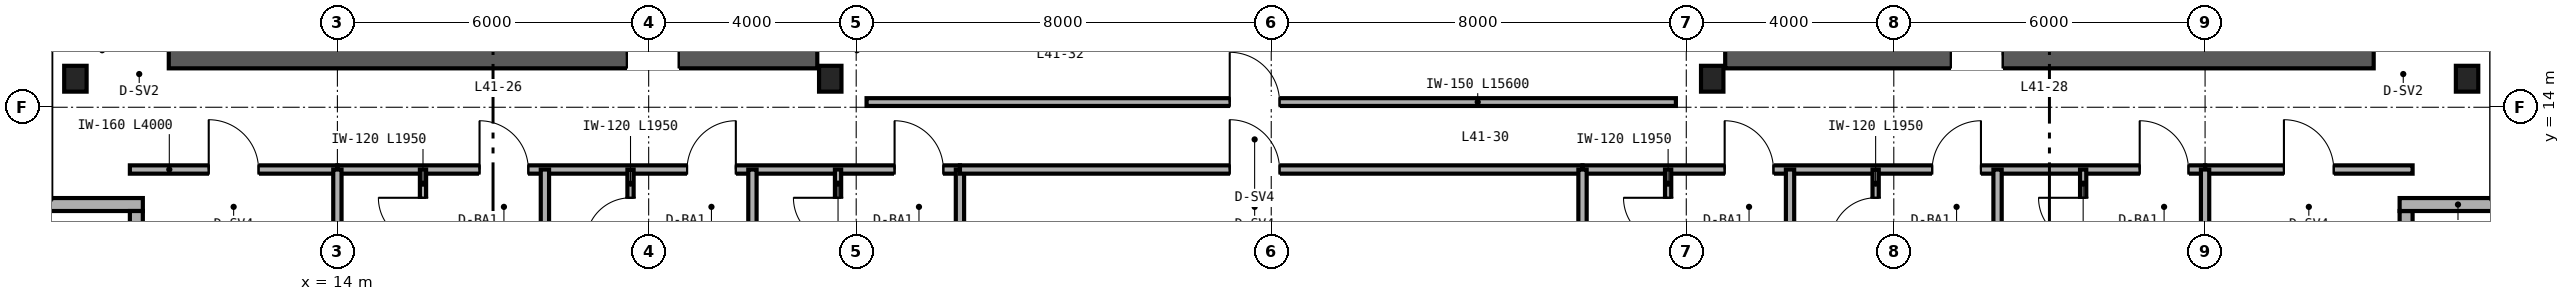
"""IFC4 building model, lengths in metres.
Left out: names, types, materials, properties, quantities, classifications, styles, units other than length and angle.
Written with IfcOpenShell. Run it as: python <this file> out.ifc"""

import sys

from ifc_helpers import new_model, si_unit, direction, frame, frame_2d, origin, origin_2d, place, context, subcontext, project, spatial, rectangle, i_section, extrude, source, transform, mapped, element, fill, save


model = new_model("IFC4")
c1 = context("Model", 3, precision=1e-05, world=origin(), true_north=direction((0.0, 1.0)))
c2 = subcontext(c1, "Body", "Model", "MODEL_VIEW")
j1 = project(units=[si_unit("LENGTHUNIT", "METRE"), si_unit("PLANEANGLEUNIT", "RADIAN")], contexts=[c1])
p1 = place(None, origin())
s1 = spatial("IfcSite", under=j1, at=p1, CompositionType="ELEMENT")
p2 = place(p1, origin())
s2 = spatial("IfcBuilding", under=s1, at=p2, CompositionType="ELEMENT")
p3 = place(p2, frame((0.0, 0.0, 166.8)))
s3 = spatial("IfcBuildingStorey", under=s2, at=p3, CompositionType="ELEMENT", Elevation=166.8)
p4 = place(p3, frame((10.75, 15.0, 0.0), z_axis=(0.0, 0.0, 1.0), x_axis=(1.0, 0.0, 0.0)))
e1 = element("IfcWall", 1, at=p4, inside=s3, PredefinedType="SHEAR", context=c2, shape_type="SweptSolid", body=[
    extrude(rectangle(XDim=12.5, YDim=0.5, at=frame_2d((6.25, 0.0))), origin(), (0.0, 0.0, 1.0), 3.37),
])
p5 = place(p4, frame((8.83, 0.0, 0.0)))
e2 = element("IfcOpeningElement", 2, at=p5, cuts=e1, PredefinedType="OPENING", context=c2, shape_type="SweptSolid", body=[
    extrude(rectangle(XDim=1.0, YDim=2.15, at=frame_2d((0.5, 1.075))), frame((0.0, 0.26, 0.0), z_axis=(0.0, -1.0, 0.0), x_axis=(1.0, 0.0, 0.0)), (0.0, 0.0, 1.0), 0.52),
])
p6 = place(p3, frame((40.75, 15.0, 0.0), z_axis=(0.0, 0.0, 1.0), x_axis=(1.0, 0.0, 0.0)))
e3 = element("IfcWall", 3, at=p6, inside=s3, PredefinedType="SHEAR", context=c2, shape_type="SweptSolid", body=[
    extrude(rectangle(XDim=12.5, YDim=0.5, at=frame_2d((6.25, 0.0))), origin(), (0.0, 0.0, 1.0), 3.37),
])
p7 = place(p6, frame((4.35, 0.0, 0.0)))
e4 = element("IfcOpeningElement", 4, at=p7, cuts=e3, PredefinedType="OPENING", context=c2, shape_type="SweptSolid", body=[
    extrude(rectangle(XDim=1.0, YDim=2.15, at=frame_2d((0.5, 1.075))), frame((0.0, 0.26, 0.0), z_axis=(0.0, -1.0, 0.0), x_axis=(1.0, 0.0, 0.0)), (0.0, 0.0, 1.0), 0.52),
])
m1 = source(origin(), c2, "Body", "SweptSolid", [
    extrude(i_section(OverallWidth=0.432, OverallDepth=0.498, WebThickness=0.056, FlangeThickness=0.089, FilletRadius=0.025, at=origin_2d()), origin(), (0.0, 0.0, 1.0), 3.37),
])
for number, where, z_axis, x_axis in (
    (5, (8.95, 14.55, 0.0), (0.0, 0.0, 1.0), (1.0, 0.0, 0.0)),
    (6, (23.5, 14.55, 0.0), (0.0, 0.0, 1.0), (1.0, 0.0, 0.0)),
    (7, (40.5, 14.55, 0.0), (0.0, 0.0, 1.0), (1.0, 0.0, 0.0)),
    (8, (55.05, 14.55, 0.0), (0.0, 0.0, 1.0), (1.0, 0.0, 0.0)),
):
    element("IfcColumn", number, at=place(p3, frame(where, z_axis=z_axis, x_axis=x_axis)), inside=s3, PredefinedType="COLUMN", context=c2, shape_type="MappedRepresentation", body=[
        mapped(m1, transform((0.0, 0.0, 0.0), scale=1.0)),
    ])
p8 = place(p3, frame((53.875, 10.0, 0.0), z_axis=(0.0, 0.0, 1.0), x_axis=(0.0, 1.0, 0.0)))
e9 = element("IfcWall", 9, at=p8, inside=s3, PredefinedType="SOLIDWALL", context=c2, shape_type="SweptSolid", body=[
    extrude(rectangle(XDim=2.0, YDim=0.25, at=frame_2d((1.0, 0.0))), origin(), (0.0, 0.0, 1.0), 3.37),
])
for number, where, z_axis, x_axis in (
    (10, (53.75, 12.125, 0.0), (0.0, 0.0, 1.0), (1.0, 0.0, 0.0)),
    (11, (8.0, 12.125, 0.0), (0.0, 0.0, 1.0), (1.0, 0.0, 0.0)),
):
    element("IfcWall", number, at=place(p3, frame(where, z_axis=z_axis, x_axis=x_axis)), inside=s3, PredefinedType="SOLIDWALL", context=c2, shape_type="SweptSolid", body=[
        extrude(rectangle(XDim=2.25, YDim=0.25, at=frame_2d((1.125, 0.0))), origin(), (0.0, 0.0, 1.0), 3.37),
    ])
p9 = place(p3, frame((10.125, 12.0, 0.0), z_axis=(0.0, 0.0, 1.0), x_axis=(0.0, -1.0, 0.0)))
e12 = element("IfcWall", 12, at=p9, inside=s3, PredefinedType="SOLIDWALL", context=c2, shape_type="SweptSolid", body=[
    extrude(rectangle(XDim=2.0, YDim=0.25, at=frame_2d((1.0, 0.0))), origin(), (0.0, 0.0, 1.0), 3.37),
])
p10 = place(p3, frame((24.2, 14.1, 0.0), z_axis=(0.0, 0.0, 1.0), x_axis=(1.0, 0.0, 0.0)))
e13 = element("IfcWall", 13, at=p10, inside=s3, PredefinedType="PARTITIONING", context=c2, shape_type="SweptSolid", body=[
    extrude(rectangle(XDim=15.6, YDim=0.15, at=frame_2d((7.8, 0.0))), origin(), (0.0, 0.0, 1.0), 3.37),
])
p11 = place(p10, frame((7.0, 0.0, 0.0)))
e14 = element("IfcOpeningElement", 14, at=p11, cuts=e13, PredefinedType="OPENING", context=c2, shape_type="SweptSolid", body=[
    extrude(rectangle(XDim=0.96, YDim=2.15, at=frame_2d((0.48, 1.075))), frame((0.0, 0.085, 0.0), z_axis=(0.0, -1.0, 0.0), x_axis=(1.0, 0.0, 0.0)), (0.0, 0.0, 1.0), 0.17),
])
p12 = place(p3, frame((10.0, 12.8, 0.0), z_axis=(0.0, 0.0, 1.0), x_axis=(1.0, 0.0, 0.0)))
e15 = element("IfcWall", 15, at=p12, inside=s3, PredefinedType="PARTITIONING", context=c2, shape_type="SweptSolid", body=[
    extrude(rectangle(XDim=4.0, YDim=0.16, at=frame_2d((2.0, 0.0))), origin(), (0.0, 0.0, 1.0), 3.37),
])
p13 = place(p12, frame((1.52, 0.0, 0.0)))
e16 = element("IfcOpeningElement", 16, at=p13, cuts=e15, PredefinedType="OPENING", context=c2, shape_type="SweptSolid", body=[
    extrude(rectangle(XDim=0.96, YDim=2.15, at=frame_2d((0.48, 1.075))), frame((0.0, 0.09, 0.0), z_axis=(0.0, -1.0, 0.0), x_axis=(1.0, 0.0, 0.0)), (0.0, 0.0, 1.0), 0.18),
])
p14 = place(p3, frame((50.0, 12.8, 0.0), z_axis=(0.0, 0.0, 1.0), x_axis=(1.0, 0.0, 0.0)))
e17 = element("IfcWall", 17, at=p14, inside=s3, PredefinedType="PARTITIONING", context=c2, shape_type="SweptSolid", body=[
    extrude(rectangle(XDim=4.0, YDim=0.16, at=frame_2d((2.0, 0.0))), origin(), (0.0, 0.0, 1.0), 3.37),
])
p15 = place(p14, frame((1.52, 0.0, 0.0)))
e18 = element("IfcOpeningElement", 18, at=p15, cuts=e17, PredefinedType="OPENING", context=c2, shape_type="SweptSolid", body=[
    extrude(rectangle(XDim=0.96, YDim=2.15, at=frame_2d((0.48, 1.075))), frame((0.0, 0.09, 0.0), z_axis=(0.0, -1.0, 0.0), x_axis=(1.0, 0.0, 0.0)), (0.0, 0.0, 1.0), 0.18),
])
p16 = place(p3, frame((14.0, 12.8, 0.0), z_axis=(0.0, 0.0, 1.0), x_axis=(1.0, 0.0, 0.0)))
e19 = element("IfcWall", 19, at=p16, inside=s3, PredefinedType="PARTITIONING", context=c2, shape_type="SweptSolid", body=[
    extrude(rectangle(XDim=12.0, YDim=0.16, at=frame_2d((6.0, 0.0))), origin(), (0.0, 0.0, 1.0), 2.913),
])
p17 = place(p16, frame((2.74, 0.0, 0.0)))
e20 = element("IfcOpeningElement", 20, at=p17, cuts=e19, PredefinedType="OPENING", context=c2, shape_type="SweptSolid", body=[
    extrude(rectangle(XDim=0.94, YDim=2.15, at=frame_2d((0.47, 1.075))), frame((0.0, 0.09, 0.0), z_axis=(0.0, -1.0, 0.0), x_axis=(1.0, 0.0, 0.0)), (0.0, 0.0, 1.0), 0.18),
])
p18 = place(p16, frame((6.74, 0.0, 0.0)))
e21 = element("IfcOpeningElement", 21, at=p18, cuts=e19, PredefinedType="OPENING", context=c2, shape_type="SweptSolid", body=[
    extrude(rectangle(XDim=0.94, YDim=2.15, at=frame_2d((0.47, 1.075))), frame((0.0, 0.09, 0.0), z_axis=(0.0, -1.0, 0.0), x_axis=(1.0, 0.0, 0.0)), (0.0, 0.0, 1.0), 0.18),
])
p19 = place(p16, frame((10.74, 0.0, 0.0)))
e22 = element("IfcOpeningElement", 22, at=p19, cuts=e19, PredefinedType="OPENING", context=c2, shape_type="SweptSolid", body=[
    extrude(rectangle(XDim=0.94, YDim=2.15, at=frame_2d((0.47, 1.075))), frame((0.0, 0.09, 0.0), z_axis=(0.0, -1.0, 0.0), x_axis=(1.0, 0.0, 0.0)), (0.0, 0.0, 1.0), 0.18),
])
p20 = place(p3, frame((14.0, 6.36, 0.0), z_axis=(0.0, 0.0, 1.0), x_axis=(0.0, 1.0, 0.0)))
e23 = element("IfcWall", 23, at=p20, inside=s3, PredefinedType="PARTITIONING", context=c2, shape_type="SweptSolid", body=[
    extrude(rectangle(XDim=6.44, YDim=0.16, at=frame_2d((3.22, 0.0))), origin(), (0.0, 0.0, 1.0), 2.677),
])
p21 = place(p3, frame((26.0, 6.36, 0.0), z_axis=(0.0, 0.0, 1.0), x_axis=(0.0, 1.0, 0.0)))
e24 = element("IfcWall", 24, at=p21, inside=s3, PredefinedType="PARTITIONING", context=c2, shape_type="SweptSolid", body=[
    extrude(rectangle(XDim=6.44, YDim=0.16, at=frame_2d((3.22, 0.0))), origin(), (0.0, 0.0, 1.0), 2.443),
])
p22 = place(p3, frame((18.0, 6.36, 0.0), z_axis=(0.0, 0.0, 1.0), x_axis=(0.0, 1.0, 0.0)))
e25 = element("IfcWall", 25, at=p22, inside=s3, PredefinedType="PARTITIONING", context=c2, shape_type="SweptSolid", body=[
    extrude(rectangle(XDim=6.44, YDim=0.16, at=frame_2d((3.22, 0.0))), origin(), (0.0, 0.0, 1.0), 2.677),
])
p23 = place(p3, frame((15.65, 10.85, 0.0), z_axis=(0.0, 0.0, 1.0), x_axis=(0.0, 1.0, 0.0)))
e26 = element("IfcWall", 26, at=p23, inside=s3, PredefinedType="PARTITIONING", context=c2, shape_type="SweptSolid", body=[
    extrude(rectangle(XDim=1.95, YDim=0.12, at=frame_2d((0.975, 0.0))), origin(), (0.0, 0.0, 1.0), 3.37),
])
p24 = place(p23, frame((0.545, 0.0, 0.0)))
e27 = element("IfcOpeningElement", 27, at=p24, cuts=e26, PredefinedType="OPENING", context=c2, shape_type="SweptSolid", body=[
    extrude(rectangle(XDim=0.86, YDim=2.1, at=frame_2d((0.43, 1.05))), frame((0.0, 0.07, 0.0), z_axis=(0.0, -1.0, 0.0), x_axis=(1.0, 0.0, 0.0)), (0.0, 0.0, 1.0), 0.14),
])
p25 = place(p3, frame((22.0, 6.36, 0.0), z_axis=(0.0, 0.0, 1.0), x_axis=(0.0, 1.0, 0.0)))
e28 = element("IfcWall", 28, at=p25, inside=s3, PredefinedType="PARTITIONING", context=c2, shape_type="SweptSolid", body=[
    extrude(rectangle(XDim=6.44, YDim=0.16, at=frame_2d((3.22, 0.0))), origin(), (0.0, 0.0, 1.0), 2.833),
])
p26 = place(p3, frame((19.65, 10.85, 0.0), z_axis=(0.0, 0.0, 1.0), x_axis=(0.0, 1.0, 0.0)))
e29 = element("IfcWall", 29, at=p26, inside=s3, PredefinedType="PARTITIONING", context=c2, shape_type="SweptSolid", body=[
    extrude(rectangle(XDim=1.95, YDim=0.12, at=frame_2d((0.975, 0.0))), origin(), (0.0, 0.0, 1.0), 3.37),
])
p27 = place(p26, frame((0.545, 0.0, 0.0)))
e30 = element("IfcOpeningElement", 30, at=p27, cuts=e29, PredefinedType="OPENING", context=c2, shape_type="SweptSolid", body=[
    extrude(rectangle(XDim=0.86, YDim=2.1, at=frame_2d((0.43, 1.05))), frame((0.0, 0.07, 0.0), z_axis=(0.0, -1.0, 0.0), x_axis=(1.0, 0.0, 0.0)), (0.0, 0.0, 1.0), 0.14),
])
p28 = place(p3, frame((23.65, 10.85, 0.0), z_axis=(0.0, 0.0, 1.0), x_axis=(0.0, 1.0, 0.0)))
e31 = element("IfcWall", 31, at=p28, inside=s3, PredefinedType="PARTITIONING", context=c2, shape_type="SweptSolid", body=[
    extrude(rectangle(XDim=1.95, YDim=0.12, at=frame_2d((0.975, 0.0))), origin(), (0.0, 0.0, 1.0), 2.913),
])
p29 = place(p28, frame((0.545, 0.0, 0.0)))
e32 = element("IfcOpeningElement", 32, at=p29, cuts=e31, PredefinedType="OPENING", context=c2, shape_type="SweptSolid", body=[
    extrude(rectangle(XDim=0.86, YDim=2.1, at=frame_2d((0.43, 1.05))), frame((0.0, 0.07, 0.0), z_axis=(0.0, -1.0, 0.0), x_axis=(1.0, 0.0, 0.0)), (0.0, 0.0, 1.0), 0.14),
])
p30 = place(p3, frame((26.0, 12.8, 0.0), z_axis=(0.0, 0.0, 1.0), x_axis=(1.0, 0.0, 0.0)))
e33 = element("IfcWall", 33, at=p30, inside=s3, PredefinedType="PARTITIONING", context=c2, shape_type="SweptSolid", body=[
    extrude(rectangle(XDim=12.0, YDim=0.16, at=frame_2d((6.0, 0.0))), origin(), (0.0, 0.0, 1.0), 3.37),
])
p31 = place(p30, frame((5.2, 0.0, 0.0)))
e34 = element("IfcOpeningElement", 34, at=p31, cuts=e33, PredefinedType="OPENING", context=c2, shape_type="SweptSolid", body=[
    extrude(rectangle(XDim=0.96, YDim=2.15, at=frame_2d((0.48, 1.075))), frame((0.0, 0.09, 0.0), z_axis=(0.0, -1.0, 0.0), x_axis=(1.0, 0.0, 0.0)), (0.0, 0.0, 1.0), 0.18),
])
p32 = place(p3, frame((38.0, 12.8, 0.0), z_axis=(0.0, 0.0, 1.0), x_axis=(1.0, 0.0, 0.0)))
e35 = element("IfcWall", 35, at=p32, inside=s3, PredefinedType="PARTITIONING", context=c2, shape_type="SweptSolid", body=[
    extrude(rectangle(XDim=12.0, YDim=0.16, at=frame_2d((6.0, 0.0))), origin(), (0.0, 0.0, 1.0), 2.913),
])
p33 = place(p32, frame((2.74, 0.0, 0.0)))
e36 = element("IfcOpeningElement", 36, at=p33, cuts=e35, PredefinedType="OPENING", context=c2, shape_type="SweptSolid", body=[
    extrude(rectangle(XDim=0.94, YDim=2.15, at=frame_2d((0.47, 1.075))), frame((0.0, 0.09, 0.0), z_axis=(0.0, -1.0, 0.0), x_axis=(1.0, 0.0, 0.0)), (0.0, 0.0, 1.0), 0.18),
])
p34 = place(p32, frame((6.74, 0.0, 0.0)))
e37 = element("IfcOpeningElement", 37, at=p34, cuts=e35, PredefinedType="OPENING", context=c2, shape_type="SweptSolid", body=[
    extrude(rectangle(XDim=0.94, YDim=2.15, at=frame_2d((0.47, 1.075))), frame((0.0, 0.09, 0.0), z_axis=(0.0, -1.0, 0.0), x_axis=(1.0, 0.0, 0.0)), (0.0, 0.0, 1.0), 0.18),
])
p35 = place(p32, frame((10.74, 0.0, 0.0)))
e38 = element("IfcOpeningElement", 38, at=p35, cuts=e35, PredefinedType="OPENING", context=c2, shape_type="SweptSolid", body=[
    extrude(rectangle(XDim=0.94, YDim=2.15, at=frame_2d((0.47, 1.075))), frame((0.0, 0.09, 0.0), z_axis=(0.0, -1.0, 0.0), x_axis=(1.0, 0.0, 0.0)), (0.0, 0.0, 1.0), 0.18),
])
p36 = place(p3, frame((38.0, 6.36, 0.0), z_axis=(0.0, 0.0, 1.0), x_axis=(0.0, 1.0, 0.0)))
e39 = element("IfcWall", 39, at=p36, inside=s3, PredefinedType="PARTITIONING", context=c2, shape_type="SweptSolid", body=[
    extrude(rectangle(XDim=6.44, YDim=0.16, at=frame_2d((3.22, 0.0))), origin(), (0.0, 0.0, 1.0), 2.443),
])
p37 = place(p3, frame((50.0, 6.36, 0.0), z_axis=(0.0, 0.0, 1.0), x_axis=(0.0, 1.0, 0.0)))
e40 = element("IfcWall", 40, at=p37, inside=s3, PredefinedType="PARTITIONING", context=c2, shape_type="SweptSolid", body=[
    extrude(rectangle(XDim=6.44, YDim=0.16, at=frame_2d((3.22, 0.0))), origin(), (0.0, 0.0, 1.0), 2.677),
])
p38 = place(p3, frame((42.0, 6.36, 0.0), z_axis=(0.0, 0.0, 1.0), x_axis=(0.0, 1.0, 0.0)))
e41 = element("IfcWall", 41, at=p38, inside=s3, PredefinedType="PARTITIONING", context=c2, shape_type="SweptSolid", body=[
    extrude(rectangle(XDim=6.44, YDim=0.16, at=frame_2d((3.22, 0.0))), origin(), (0.0, 0.0, 1.0), 2.833),
])
p39 = place(p3, frame((39.65, 10.85, 0.0), z_axis=(0.0, 0.0, 1.0), x_axis=(0.0, 1.0, 0.0)))
e42 = element("IfcWall", 42, at=p39, inside=s3, PredefinedType="PARTITIONING", context=c2, shape_type="SweptSolid", body=[
    extrude(rectangle(XDim=1.95, YDim=0.12, at=frame_2d((0.975, 0.0))), origin(), (0.0, 0.0, 1.0), 3.37),
])
p40 = place(p39, frame((0.545, 0.0, 0.0)))
e43 = element("IfcOpeningElement", 43, at=p40, cuts=e42, PredefinedType="OPENING", context=c2, shape_type="SweptSolid", body=[
    extrude(rectangle(XDim=0.86, YDim=2.1, at=frame_2d((0.43, 1.05))), frame((0.0, 0.07, 0.0), z_axis=(0.0, -1.0, 0.0), x_axis=(1.0, 0.0, 0.0)), (0.0, 0.0, 1.0), 0.14),
])
p41 = place(p3, frame((46.0, 6.36, 0.0), z_axis=(0.0, 0.0, 1.0), x_axis=(0.0, 1.0, 0.0)))
e44 = element("IfcWall", 44, at=p41, inside=s3, PredefinedType="PARTITIONING", context=c2, shape_type="SweptSolid", body=[
    extrude(rectangle(XDim=6.44, YDim=0.16, at=frame_2d((3.22, 0.0))), origin(), (0.0, 0.0, 1.0), 2.677),
])
p42 = place(p3, frame((43.65, 10.85, 0.0), z_axis=(0.0, 0.0, 1.0), x_axis=(0.0, 1.0, 0.0)))
e45 = element("IfcWall", 45, at=p42, inside=s3, PredefinedType="PARTITIONING", context=c2, shape_type="SweptSolid", body=[
    extrude(rectangle(XDim=1.95, YDim=0.12, at=frame_2d((0.975, 0.0))), origin(), (0.0, 0.0, 1.0), 3.37),
])
p43 = place(p42, frame((0.545, 0.0, 0.0)))
e46 = element("IfcOpeningElement", 46, at=p43, cuts=e45, PredefinedType="OPENING", context=c2, shape_type="SweptSolid", body=[
    extrude(rectangle(XDim=0.86, YDim=2.1, at=frame_2d((0.43, 1.05))), frame((0.0, 0.07, 0.0), z_axis=(0.0, -1.0, 0.0), x_axis=(1.0, 0.0, 0.0)), (0.0, 0.0, 1.0), 0.14),
])
p44 = place(p3, frame((47.65, 10.85, 0.0), z_axis=(0.0, 0.0, 1.0), x_axis=(0.0, 1.0, 0.0)))
e47 = element("IfcWall", 47, at=p44, inside=s3, PredefinedType="PARTITIONING", context=c2, shape_type="SweptSolid", body=[
    extrude(rectangle(XDim=1.95, YDim=0.12, at=frame_2d((0.975, 0.0))), origin(), (0.0, 0.0, 1.0), 3.37),
])
p45 = place(p44, frame((0.545, 0.0, 0.0)))
e48 = element("IfcOpeningElement", 48, at=p45, cuts=e47, PredefinedType="OPENING", context=c2, shape_type="SweptSolid", body=[
    extrude(rectangle(XDim=0.86, YDim=2.1, at=frame_2d((0.43, 1.05))), frame((0.0, 0.07, 0.0), z_axis=(0.0, -1.0, 0.0), x_axis=(1.0, 0.0, 0.0)), (0.0, 0.0, 1.0), 0.14),
])
m2 = source(origin(), c2, "Body", "SweptSolid", [
    extrude(rectangle(XDim=1.0, YDim=2.15, at=frame_2d((0.5, 1.075))), frame((0.0, 0.025, 0.0), z_axis=(0.0, -1.0, 0.0), x_axis=(1.0, 0.0, 0.0)), (0.0, 0.0, 1.0), 0.05),
])
p46 = place(p5, origin())
e49 = element("IfcDoor", 49, at=p46, inside=s3, OperationType="SINGLE_SWING_LEFT", PredefinedType="DOOR", context=c2, shape_type="MappedRepresentation", body=[
    mapped(m2, transform((0.0, 0.0, 0.0), scale=1.0)),
])
fill(e2, e49)
p47 = place(p7, origin())
e50 = element("IfcDoor", 50, at=p47, inside=s3, OperationType="SINGLE_SWING_RIGHT", PredefinedType="DOOR", context=c2, shape_type="MappedRepresentation", body=[
    mapped(m2, transform((0.0, 0.0, 0.0), scale=1.0)),
])
fill(e4, e50)
m3 = source(origin(), c2, "Body", "SweptSolid", [
    extrude(rectangle(XDim=0.96, YDim=2.15, at=frame_2d((0.48, 1.075))), frame((0.0, 0.025, 0.0), z_axis=(0.0, -1.0, 0.0), x_axis=(1.0, 0.0, 0.0)), (0.0, 0.0, 1.0), 0.05),
])
p48 = place(p11, origin())
e51 = element("IfcDoor", 51, at=p48, inside=s3, OperationType="SINGLE_SWING_LEFT", PredefinedType="DOOR", context=c2, shape_type="MappedRepresentation", body=[
    mapped(m3, transform((0.0, 0.0, 0.0), scale=1.0)),
])
fill(e14, e51)
p49 = place(p13, origin())
e52 = element("IfcDoor", 52, at=p49, inside=s3, OperationType="SINGLE_SWING_LEFT", PredefinedType="DOOR", context=c2, shape_type="MappedRepresentation", body=[
    mapped(m3, transform((0.0, 0.0, 0.0), scale=1.0)),
])
fill(e16, e52)
p50 = place(p15, origin())
e53 = element("IfcDoor", 53, at=p50, inside=s3, OperationType="SINGLE_SWING_LEFT", PredefinedType="DOOR", context=c2, shape_type="MappedRepresentation", body=[
    mapped(m3, transform((0.0, 0.0, 0.0), scale=1.0)),
])
fill(e18, e53)
m4 = source(origin(), c2, "Body", "SweptSolid", [
    extrude(rectangle(XDim=0.86, YDim=2.1, at=frame_2d((0.43, 1.05))), frame((0.0, 0.025, 0.0), z_axis=(0.0, -1.0, 0.0), x_axis=(1.0, 0.0, 0.0)), (0.0, 0.0, 1.0), 0.05),
])
p51 = place(p24, origin())
e54 = element("IfcDoor", 54, at=p51, inside=s3, OperationType="SINGLE_SWING_RIGHT", PredefinedType="DOOR", context=c2, shape_type="MappedRepresentation", body=[
    mapped(m4, transform((0.0, 0.0, 0.0), scale=1.0)),
])
fill(e27, e54)
p52 = place(p27, origin())
e55 = element("IfcDoor", 55, at=p52, inside=s3, OperationType="SINGLE_SWING_LEFT", PredefinedType="DOOR", context=c2, shape_type="MappedRepresentation", body=[
    mapped(m4, transform((0.0, 0.0, 0.0), scale=1.0)),
])
fill(e30, e55)
p53 = place(p29, origin())
e56 = element("IfcDoor", 56, at=p53, inside=s3, OperationType="SINGLE_SWING_RIGHT", PredefinedType="DOOR", context=c2, shape_type="MappedRepresentation", body=[
    mapped(m4, transform((0.0, 0.0, 0.0), scale=1.0)),
])
fill(e32, e56)
m5 = source(origin(), c2, "Body", "SweptSolid", [
    extrude(rectangle(XDim=0.94, YDim=2.15, at=frame_2d((0.47, 1.075))), frame((0.0, 0.025, 0.0), z_axis=(0.0, -1.0, 0.0), x_axis=(1.0, 0.0, 0.0)), (0.0, 0.0, 1.0), 0.05),
])
p54 = place(p17, origin())
e57 = element("IfcDoor", 57, at=p54, inside=s3, OperationType="SINGLE_SWING_LEFT", PredefinedType="DOOR", context=c2, shape_type="MappedRepresentation", body=[
    mapped(m5, transform((0.0, 0.0, 0.0), scale=1.0)),
])
fill(e20, e57)
p55 = place(p18, origin())
e58 = element("IfcDoor", 58, at=p55, inside=s3, OperationType="SINGLE_SWING_RIGHT", PredefinedType="DOOR", context=c2, shape_type="MappedRepresentation", body=[
    mapped(m5, transform((0.0, 0.0, 0.0), scale=1.0)),
])
fill(e21, e58)
p56 = place(p19, origin())
e59 = element("IfcDoor", 59, at=p56, inside=s3, OperationType="SINGLE_SWING_LEFT", PredefinedType="DOOR", context=c2, shape_type="MappedRepresentation", body=[
    mapped(m5, transform((0.0, 0.0, 0.0), scale=1.0)),
])
fill(e22, e59)
p57 = place(p31, origin())
e60 = element("IfcDoor", 60, at=p57, inside=s3, OperationType="SINGLE_SWING_LEFT", PredefinedType="DOOR", context=c2, shape_type="MappedRepresentation", body=[
    mapped(m3, transform((0.0, 0.0, 0.0), scale=1.0)),
])
fill(e34, e60)
p58 = place(p40, origin())
e61 = element("IfcDoor", 61, at=p58, inside=s3, OperationType="SINGLE_SWING_RIGHT", PredefinedType="DOOR", context=c2, shape_type="MappedRepresentation", body=[
    mapped(m4, transform((0.0, 0.0, 0.0), scale=1.0)),
])
fill(e43, e61)
p59 = place(p43, origin())
e62 = element("IfcDoor", 62, at=p59, inside=s3, OperationType="SINGLE_SWING_LEFT", PredefinedType="DOOR", context=c2, shape_type="MappedRepresentation", body=[
    mapped(m4, transform((0.0, 0.0, 0.0), scale=1.0)),
])
fill(e46, e62)
p60 = place(p45, origin())
e63 = element("IfcDoor", 63, at=p60, inside=s3, OperationType="SINGLE_SWING_RIGHT", PredefinedType="DOOR", context=c2, shape_type="MappedRepresentation", body=[
    mapped(m4, transform((0.0, 0.0, 0.0), scale=1.0)),
])
fill(e48, e63)
p61 = place(p33, origin())
e64 = element("IfcDoor", 64, at=p61, inside=s3, OperationType="SINGLE_SWING_LEFT", PredefinedType="DOOR", context=c2, shape_type="MappedRepresentation", body=[
    mapped(m5, transform((0.0, 0.0, 0.0), scale=1.0)),
])
fill(e36, e64)
p62 = place(p34, origin())
e65 = element("IfcDoor", 65, at=p62, inside=s3, OperationType="SINGLE_SWING_RIGHT", PredefinedType="DOOR", context=c2, shape_type="MappedRepresentation", body=[
    mapped(m5, transform((0.0, 0.0, 0.0), scale=1.0)),
])
fill(e37, e65)
p63 = place(p35, origin())
e66 = element("IfcDoor", 66, at=p63, inside=s3, OperationType="SINGLE_SWING_LEFT", PredefinedType="DOOR", context=c2, shape_type="MappedRepresentation", body=[
    mapped(m5, transform((0.0, 0.0, 0.0), scale=1.0)),
])
fill(e38, e66)
save(model, sys.argv[1])
